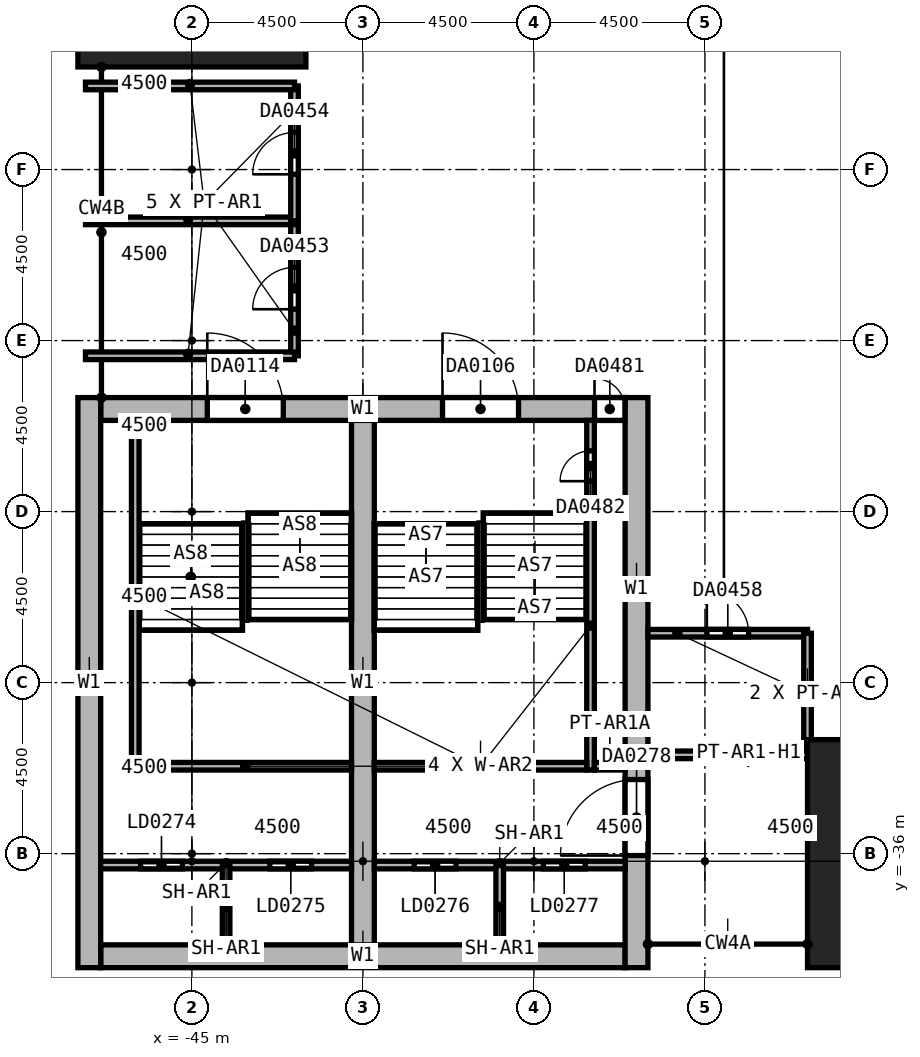
"""IFC4 building model, lengths in metres.
Left out: names, types, materials, properties, quantities, classifications, styles, units other than length and angle.
Written with IfcOpenShell. Run it as: python <this file> out.ifc"""

import sys

from ifc_helpers import new_model, si_unit, direction, frame, frame_2d, origin, origin_2d, place, context, subcontext, project, spatial, rectangle, extrude, element, fill, save


model = new_model("IFC4")
c1 = context("Model", 3, precision=1e-05, world=origin(), true_north=direction((0.0, 1.0)))
c2 = subcontext(c1, "Body", "Model", "MODEL_VIEW")
j1 = project(units=[si_unit("LENGTHUNIT", "METRE"), si_unit("PLANEANGLEUNIT", "RADIAN")], contexts=[c1])
p1 = place(None, origin())
s1 = spatial("IfcSite", under=j1, at=p1, CompositionType="ELEMENT")
p2 = place(p1, origin())
s2 = spatial("IfcBuilding", under=s1, at=p2, CompositionType="ELEMENT")
p3 = place(p2, frame((0.0, 0.0, 37.0)))
s3 = spatial("IfcBuildingStorey", under=s2, at=p3, CompositionType="ELEMENT", Elevation=37.0)
for number, where, z_axis, x_axis in (
    (1, (-27.0, -36.0, 0.0), (0.0, 0.0, 1.0), (1.0, 0.0, 0.0)),
    (2, (-45.0, -13.5, 0.0), (0.0, 0.0, 1.0), (0.0, 1.0, 0.0)),
):
    element("IfcColumn", number, at=place(p3, frame(where, z_axis=z_axis, x_axis=x_axis)), inside=s3, PredefinedType="COLUMN", context=c2, shape_type="SweptSolid", body=[
        extrude(rectangle(XDim=3.6, YDim=6.0, at=origin_2d()), origin(), (0.0, 0.0, 1.0), 5.8),
    ])
p4 = place(p3, frame((-47.4, -24.3, 0.0), z_axis=(0.0, 0.0, 1.0), x_axis=(1.0, 0.0, 0.0)))
e3 = element("IfcWall", 3, at=p4, inside=s3, PredefinedType="SHEAR", context=c2, shape_type="SweptSolid", body=[
    extrude(rectangle(XDim=13.8, YDim=0.6, at=frame_2d((6.9, 0.0))), origin(), (0.0, 0.0, 1.0), 7.0),
])
p5 = place(p4, frame((8.995, 0.0, 0.0)))
e4 = element("IfcOpeningElement", 4, at=p5, cuts=e3, PredefinedType="OPENING", context=c2, shape_type="SweptSolid", body=[
    extrude(rectangle(XDim=2.0, YDim=2.4, at=frame_2d((1.0, 1.2))), frame((0.0, 0.3, 0.0), z_axis=(0.0, -1.0, 0.0), x_axis=(1.0, 0.0, 0.0)), (0.0, 0.0, 1.0), 0.6),
])
p6 = place(p4, frame((2.805, 0.0, 0.0)))
e5 = element("IfcOpeningElement", 5, at=p6, cuts=e3, PredefinedType="OPENING", context=c2, shape_type="SweptSolid", body=[
    extrude(rectangle(XDim=2.0, YDim=2.4, at=frame_2d((1.0, 1.2))), frame((0.0, 0.3, 0.0), z_axis=(0.0, -1.0, 0.0), x_axis=(1.0, 0.0, 0.0)), (0.0, 0.0, 1.0), 0.6),
])
p7 = place(p4, frame((12.995, 0.0, 0.0)))
e6 = element("IfcOpeningElement", 6, at=p7, cuts=e3, PredefinedType="OPENING", context=c2, shape_type="SweptSolid", body=[
    extrude(rectangle(XDim=0.8, YDim=2.1, at=frame_2d((0.4, 1.05))), frame((0.0, 0.3, 0.0), z_axis=(0.0, -1.0, 0.0), x_axis=(1.0, 0.0, 0.0)), (0.0, 0.0, 1.0), 0.6),
])
p8 = place(p3, frame((-47.4, -38.7, 0.0), z_axis=(0.0, 0.0, 1.0), x_axis=(1.0, 0.0, 0.0)))
e7 = element("IfcWall", 7, at=p8, inside=s3, PredefinedType="SHEAR", context=c2, shape_type="SweptSolid", body=[
    extrude(rectangle(XDim=13.8, YDim=0.6, at=frame_2d((6.9, 0.0))), origin(), (0.0, 0.0, 1.0), 7.0),
])
p9 = place(p3, frame((-47.7, -39.0, 0.0), z_axis=(0.0, 0.0, 1.0), x_axis=(0.0, 1.0, 0.0)))
e8 = element("IfcWall", 8, at=p9, inside=s3, PredefinedType="SHEAR", context=c2, shape_type="SweptSolid", body=[
    extrude(rectangle(XDim=15.0, YDim=0.6, at=frame_2d((7.5, 0.0))), origin(), (0.0, 0.0, 1.0), 7.0),
])
p10 = place(p3, frame((-33.3, -39.0, 0.0), z_axis=(0.0, 0.0, 1.0), x_axis=(0.0, 1.0, 0.0)))
e9 = element("IfcWall", 9, at=p10, inside=s3, PredefinedType="SHEAR", context=c2, shape_type="SweptSolid", body=[
    extrude(rectangle(XDim=15.0, YDim=0.6, at=frame_2d((7.5, 0.0))), origin(), (0.0, 0.0, 1.0), 7.0),
])
p11 = place(p10, frame((2.95, 0.0, 0.0)))
e10 = element("IfcOpeningElement", 10, at=p11, cuts=e9, PredefinedType="OPENING", context=c2, shape_type="SweptSolid", body=[
    extrude(rectangle(XDim=2.0, YDim=2.4, at=frame_2d((1.0, 1.2))), frame((0.0, 0.3, 0.0), z_axis=(0.0, -1.0, 0.0), x_axis=(1.0, 0.0, 0.0)), (0.0, 0.0, 1.0), 0.6),
])
p12 = place(p3, frame((-40.5, -38.4, 0.0), z_axis=(0.0, 0.0, 1.0), x_axis=(0.0, 1.0, 0.0)))
e11 = element("IfcWall", 11, at=p12, inside=s3, PredefinedType="SHEAR", context=c2, shape_type="SweptSolid", body=[
    extrude(rectangle(XDim=13.8, YDim=0.6, at=frame_2d((6.9, 0.0))), origin(), (0.0, 0.0, 1.0), 7.0),
])
p13 = place(p3, frame((-34.51, -33.8, 0.0), z_axis=(0.0, 0.0, 1.0), x_axis=(0.0, 1.0, 0.0)))
e12 = element("IfcWall", 12, at=p13, inside=s3, PredefinedType="SOLIDWALL", context=c2, shape_type="SweptSolid", body=[
    extrude(rectangle(XDim=9.2, YDim=0.2, at=frame_2d((4.6, 0.0))), origin(), (0.0, 0.0, 1.0), 7.0),
])
p14 = place(p13, frame((7.6, 0.0, 0.0)))
e13 = element("IfcOpeningElement", 13, at=p14, cuts=e12, PredefinedType="OPENING", context=c2, shape_type="SweptSolid", body=[
    extrude(rectangle(XDim=0.8, YDim=2.1, at=frame_2d((0.4, 1.05))), frame((0.0, 0.1, 0.0), z_axis=(0.0, -1.0, 0.0), x_axis=(1.0, 0.0, 0.0)), (0.0, 0.0, 1.0), 0.2),
])
p15 = place(p3, frame((-40.2, -33.7, 0.0), z_axis=(0.0, 0.0, 1.0), x_axis=(1.0, 0.0, 0.0)))
e14 = element("IfcWall", 14, at=p15, inside=s3, PredefinedType="SOLIDWALL", context=c2, shape_type="SweptSolid", body=[
    extrude(rectangle(XDim=5.59, YDim=0.2, at=frame_2d((2.795, 0.0))), origin(), (0.0, 0.0, 1.0), 7.0),
])
p16 = place(p3, frame((-46.49, -33.8, 0.0), z_axis=(0.0, 0.0, 1.0), x_axis=(0.0, 1.0, 0.0)))
e15 = element("IfcWall", 15, at=p16, inside=s3, PredefinedType="SOLIDWALL", context=c2, shape_type="SweptSolid", body=[
    extrude(rectangle(XDim=9.2, YDim=0.2, at=frame_2d((4.6, 0.0))), origin(), (0.0, 0.0, 1.0), 7.0),
])
p17 = place(p3, frame((-46.39, -33.7, 0.0), z_axis=(0.0, 0.0, 1.0), x_axis=(1.0, 0.0, 0.0)))
e16 = element("IfcWall", 16, at=p17, inside=s3, PredefinedType="SOLIDWALL", context=c2, shape_type="SweptSolid", body=[
    extrude(rectangle(XDim=5.59, YDim=0.2, at=frame_2d((2.795, 0.0))), origin(), (0.0, 0.0, 1.0), 7.0),
])
p18 = place(p3, frame((-47.4, -36.3, 0.0), z_axis=(0.0, 0.0, 1.0), x_axis=(1.0, 0.0, 0.0)))
e17 = element("IfcWall", 17, at=p18, inside=s3, PredefinedType="SHEAR", context=c2, shape_type="SweptSolid", body=[
    extrude(rectangle(XDim=6.6, YDim=0.2, at=frame_2d((3.3, 0.0))), origin(), (0.0, 0.0, 1.0), 7.0),
])
p19 = place(p18, frame((1.05, 0.0, 0.0)))
e18 = element("IfcOpeningElement", 18, at=p19, cuts=e17, PredefinedType="OPENING", context=c2, shape_type="SweptSolid", body=[
    extrude(rectangle(XDim=1.1, YDim=2.4, at=frame_2d((0.55, 1.2))), frame((0.0, 0.1, 0.0), z_axis=(0.0, -1.0, 0.0), x_axis=(1.0, 0.0, 0.0)), (0.0, 0.0, 1.0), 0.2),
])
p20 = place(p18, frame((4.45, 0.0, 0.0)))
e19 = element("IfcOpeningElement", 19, at=p20, cuts=e17, PredefinedType="OPENING", context=c2, shape_type="SweptSolid", body=[
    extrude(rectangle(XDim=1.1, YDim=2.4, at=frame_2d((0.55, 1.2))), frame((0.0, 0.1, 0.0), z_axis=(0.0, -1.0, 0.0), x_axis=(1.0, 0.0, 0.0)), (0.0, 0.0, 1.0), 0.2),
])
p21 = place(p3, frame((-40.2, -36.3, 0.0), z_axis=(0.0, 0.0, 1.0), x_axis=(1.0, 0.0, 0.0)))
e20 = element("IfcWall", 20, at=p21, inside=s3, PredefinedType="SHEAR", context=c2, shape_type="SweptSolid", body=[
    extrude(rectangle(XDim=6.6, YDim=0.2, at=frame_2d((3.3, 0.0))), origin(), (0.0, 0.0, 1.0), 7.0),
])
p22 = place(p21, frame((1.05, 0.0, 0.0)))
e21 = element("IfcOpeningElement", 21, at=p22, cuts=e20, PredefinedType="OPENING", context=c2, shape_type="SweptSolid", body=[
    extrude(rectangle(XDim=1.1, YDim=2.4, at=frame_2d((0.55, 1.2))), frame((0.0, 0.1, 0.0), z_axis=(0.0, -1.0, 0.0), x_axis=(1.0, 0.0, 0.0)), (0.0, 0.0, 1.0), 0.2),
])
p23 = place(p21, frame((4.45, 0.0, 0.0)))
e22 = element("IfcOpeningElement", 22, at=p23, cuts=e20, PredefinedType="OPENING", context=c2, shape_type="SweptSolid", body=[
    extrude(rectangle(XDim=1.1, YDim=2.4, at=frame_2d((0.55, 1.2))), frame((0.0, 0.1, 0.0), z_axis=(0.0, -1.0, 0.0), x_axis=(1.0, 0.0, 0.0)), (0.0, 0.0, 1.0), 0.2),
])
for number, where, z_axis, x_axis in (
    (23, (-36.9, -38.4, 0.0), (0.0, 0.0, 1.0), (0.0, 1.0, 0.0)),
    (24, (-44.1, -38.4, 0.0), (0.0, 0.0, 1.0), (0.0, 1.0, 0.0)),
):
    element("IfcWall", number, at=place(p3, frame(where, z_axis=z_axis, x_axis=x_axis)), inside=s3, PredefinedType="SHEAR", context=c2, shape_type="SweptSolid", body=[
        extrude(rectangle(XDim=2.1, YDim=0.2, at=frame_2d((1.05, 0.0))), origin(), (0.0, 0.0, 1.0), 7.0),
    ])
p24 = place(p3, frame((-42.3, -22.9, 0.0), z_axis=(0.0, 0.0, 1.0), x_axis=(0.0, 1.0, 0.0)))
e25 = element("IfcWall", 25, at=p24, inside=s3, PredefinedType="PARTITIONING", context=c2, shape_type="SweptSolid", body=[
    extrude(rectangle(XDim=3.55, YDim=0.2, at=frame_2d((1.775, 0.0))), origin(), (0.0, 0.0, 1.0), 6.7),
])
p25 = place(p24, frame((1.225, 0.0, 0.0)))
e26 = element("IfcOpeningElement", 26, at=p25, cuts=e25, PredefinedType="OPENING", context=c2, shape_type="SweptSolid", body=[
    extrude(rectangle(XDim=1.1, YDim=2.4, at=frame_2d((0.55, 1.2))), frame((0.0, 0.1, 0.0), z_axis=(0.0, -1.0, 0.0), x_axis=(1.0, 0.0, 0.0)), (0.0, 0.0, 1.0), 0.2),
])
for number, where, z_axis, x_axis in (
    (27, (-42.3, -22.9, 0.0), (0.0, 0.0, 1.0), (-1.0, 0.0, 0.0)),
    (28, (-47.8, -19.35, 0.0), (0.0, 0.0, 1.0), (1.0, 0.0, 0.0)),
):
    element("IfcWall", number, at=place(p3, frame(where, z_axis=z_axis, x_axis=x_axis)), inside=s3, PredefinedType="PARTITIONING", context=c2, shape_type="SweptSolid", body=[
        extrude(rectangle(XDim=5.5, YDim=0.2, at=frame_2d((2.75, 0.0))), origin(), (0.0, 0.0, 1.0), 6.7),
    ])
p26 = place(p3, frame((-42.3, -19.35, 0.0), z_axis=(0.0, 0.0, 1.0), x_axis=(0.0, 1.0, 0.0)))
e29 = element("IfcWall", 29, at=p26, inside=s3, PredefinedType="PARTITIONING", context=c2, shape_type="SweptSolid", body=[
    extrude(rectangle(XDim=3.55, YDim=0.2, at=frame_2d((1.775, 0.0))), origin(), (0.0, 0.0, 1.0), 6.7),
])
p27 = place(p26, frame((1.225, 0.0, 0.0)))
e30 = element("IfcOpeningElement", 30, at=p27, cuts=e29, PredefinedType="OPENING", context=c2, shape_type="SweptSolid", body=[
    extrude(rectangle(XDim=1.1, YDim=2.4, at=frame_2d((0.55, 1.2))), frame((0.0, 0.1, 0.0), z_axis=(0.0, -1.0, 0.0), x_axis=(1.0, 0.0, 0.0)), (0.0, 0.0, 1.0), 0.2),
])
p28 = place(p3, frame((-42.3, -15.8, 0.0), z_axis=(0.0, 0.0, 1.0), x_axis=(-1.0, 0.0, 0.0)))
e31 = element("IfcWall", 31, at=p28, inside=s3, PredefinedType="PARTITIONING", context=c2, shape_type="SweptSolid", body=[
    extrude(rectangle(XDim=5.5, YDim=0.2, at=frame_2d((2.75, 0.0))), origin(), (0.0, 0.0, 1.0), 6.7),
])
p29 = place(p3, frame((-33.0, -30.2, 0.0), z_axis=(0.0, 0.0, 1.0), x_axis=(1.0, 0.0, 0.0)))
e32 = element("IfcWall", 32, at=p29, inside=s3, PredefinedType="PARTITIONING", context=c2, shape_type="SweptSolid", body=[
    extrude(rectangle(XDim=4.2, YDim=0.2, at=frame_2d((2.1, 0.0))), origin(), (0.0, 0.0, 1.0), 6.7),
])
p30 = place(p29, frame((1.55, 0.0, 0.0)))
e33 = element("IfcOpeningElement", 33, at=p30, cuts=e32, PredefinedType="OPENING", context=c2, shape_type="SweptSolid", body=[
    extrude(rectangle(XDim=1.1, YDim=2.4, at=frame_2d((0.55, 1.2))), frame((0.0, 0.1, 0.0), z_axis=(0.0, -1.0, 0.0), x_axis=(1.0, 0.0, 0.0)), (0.0, 0.0, 1.0), 0.2),
])
p31 = place(p3, frame((-28.8, -33.4, 0.0), z_axis=(0.0, 0.0, 1.0), x_axis=(0.0, 1.0, 0.0)))
e34 = element("IfcWall", 34, at=p31, inside=s3, PredefinedType="PARTITIONING", context=c2, shape_type="SweptSolid", body=[
    extrude(rectangle(XDim=3.2, YDim=0.2, at=frame_2d((1.6, 0.0))), origin(), (0.0, 0.0, 1.0), 6.7),
])
p32 = place(p3, frame((-33.0, -33.4, 0.0), z_axis=(0.0, 0.0, 1.0), x_axis=(1.0, 0.0, 0.0)))
e35 = element("IfcWall", 35, at=p32, inside=s3, PredefinedType="PARTITIONING", context=c2, shape_type="SweptSolid", body=[
    extrude(rectangle(XDim=4.2, YDim=0.2, at=frame_2d((2.1, 0.0))), origin(), (0.0, 0.0, 1.0), 6.089),
])
p33 = place(p3, frame((-34.41, -33.7, 0.0), z_axis=(0.0, 0.0, 1.0), x_axis=(1.0, 0.0, 0.0)))
e36 = element("IfcWall", 36, at=p33, inside=s3, PredefinedType="PARTITIONING", context=c2, shape_type="SweptSolid", body=[
    extrude(rectangle(XDim=0.81, YDim=0.2, at=frame_2d((0.405, 0.0))), origin(), (0.0, 0.0, 1.0), 7.0),
])
p34 = place(p5, frame((2.0, 0.0, 0.0), z_axis=(0.0, 0.0, 1.0), x_axis=(-1.0, 0.0, 0.0)))
e37 = element("IfcDoor", 37, at=p34, inside=s3, OperationType="DOUBLE_DOOR_SINGLE_SWING", PredefinedType="DOOR", context=c2, shape_type="SweptSolid", body=[
    extrude(rectangle(XDim=2.0, YDim=2.4, at=frame_2d((1.0, 1.2))), frame((0.0, 0.025, 0.0), z_axis=(0.0, -1.0, 0.0), x_axis=(1.0, 0.0, 0.0)), (0.0, 0.0, 1.0), 0.05),
])
fill(e4, e37)
p35 = place(p6, frame((2.0, 0.0, 0.0), z_axis=(0.0, 0.0, 1.0), x_axis=(-1.0, 0.0, 0.0)))
e38 = element("IfcDoor", 38, at=p35, inside=s3, OperationType="DOUBLE_DOOR_SINGLE_SWING", PredefinedType="DOOR", context=c2, shape_type="SweptSolid", body=[
    extrude(rectangle(XDim=2.0, YDim=2.4, at=frame_2d((1.0, 1.2))), frame((0.0, 0.025, 0.0), z_axis=(0.0, -1.0, 0.0), x_axis=(1.0, 0.0, 0.0)), (0.0, 0.0, 1.0), 0.05),
])
fill(e5, e38)
p36 = place(p19, frame((1.1, 0.0, 0.0), z_axis=(0.0, 0.0, 1.0), x_axis=(-1.0, 0.0, 0.0)))
e39 = element("IfcDoor", 39, at=p36, inside=s3, OperationType="DOUBLE_DOOR_SLIDING", PredefinedType="DOOR", context=c2, shape_type="SweptSolid", body=[
    extrude(rectangle(XDim=1.1, YDim=2.4, at=frame_2d((0.55, 1.2))), frame((0.0, 0.025, 0.0), z_axis=(0.0, -1.0, 0.0), x_axis=(1.0, 0.0, 0.0)), (0.0, 0.0, 1.0), 0.05),
])
fill(e18, e39)
p37 = place(p20, frame((1.1, 0.0, 0.0), z_axis=(0.0, 0.0, 1.0), x_axis=(-1.0, 0.0, 0.0)))
e40 = element("IfcDoor", 40, at=p37, inside=s3, OperationType="DOUBLE_DOOR_SLIDING", PredefinedType="DOOR", context=c2, shape_type="SweptSolid", body=[
    extrude(rectangle(XDim=1.1, YDim=2.4, at=frame_2d((0.55, 1.2))), frame((0.0, 0.025, 0.0), z_axis=(0.0, -1.0, 0.0), x_axis=(1.0, 0.0, 0.0)), (0.0, 0.0, 1.0), 0.05),
])
fill(e19, e40)
p38 = place(p22, frame((1.1, 0.0, 0.0), z_axis=(0.0, 0.0, 1.0), x_axis=(-1.0, 0.0, 0.0)))
e41 = element("IfcDoor", 41, at=p38, inside=s3, OperationType="DOUBLE_DOOR_SLIDING", PredefinedType="DOOR", context=c2, shape_type="SweptSolid", body=[
    extrude(rectangle(XDim=1.1, YDim=2.4, at=frame_2d((0.55, 1.2))), frame((0.0, 0.025, 0.0), z_axis=(0.0, -1.0, 0.0), x_axis=(1.0, 0.0, 0.0)), (0.0, 0.0, 1.0), 0.05),
])
fill(e21, e41)
p39 = place(p23, frame((1.1, 0.0, 0.0), z_axis=(0.0, 0.0, 1.0), x_axis=(-1.0, 0.0, 0.0)))
e42 = element("IfcDoor", 42, at=p39, inside=s3, OperationType="DOUBLE_DOOR_SLIDING", PredefinedType="DOOR", context=c2, shape_type="SweptSolid", body=[
    extrude(rectangle(XDim=1.1, YDim=2.4, at=frame_2d((0.55, 1.2))), frame((0.0, 0.025, 0.0), z_axis=(0.0, -1.0, 0.0), x_axis=(1.0, 0.0, 0.0)), (0.0, 0.0, 1.0), 0.05),
])
fill(e22, e42)
p40 = place(p11, origin())
e43 = element("IfcDoor", 43, at=p40, inside=s3, OperationType="DOUBLE_DOOR_SINGLE_SWING", PredefinedType="DOOR", context=c2, shape_type="SweptSolid", body=[
    extrude(rectangle(XDim=2.0, YDim=2.4, at=frame_2d((1.0, 1.2))), frame((0.0, 0.025, 0.0), z_axis=(0.0, -1.0, 0.0), x_axis=(1.0, 0.0, 0.0)), (0.0, 0.0, 1.0), 0.05),
])
fill(e10, e43)
p41 = place(p25, origin())
e44 = element("IfcDoor", 44, at=p41, inside=s3, OperationType="DOUBLE_DOOR_SINGLE_SWING", PredefinedType="DOOR", context=c2, shape_type="SweptSolid", body=[
    extrude(rectangle(XDim=1.1, YDim=2.4, at=frame_2d((0.55, 1.2))), frame((0.0, 0.025, 0.0), z_axis=(0.0, -1.0, 0.0), x_axis=(1.0, 0.0, 0.0)), (0.0, 0.0, 1.0), 0.05),
])
fill(e26, e44)
p42 = place(p27, origin())
e45 = element("IfcDoor", 45, at=p42, inside=s3, OperationType="DOUBLE_DOOR_SINGLE_SWING", PredefinedType="DOOR", context=c2, shape_type="SweptSolid", body=[
    extrude(rectangle(XDim=1.1, YDim=2.4, at=frame_2d((0.55, 1.2))), frame((0.0, 0.025, 0.0), z_axis=(0.0, -1.0, 0.0), x_axis=(1.0, 0.0, 0.0)), (0.0, 0.0, 1.0), 0.05),
])
fill(e30, e45)
p43 = place(p30, origin())
e46 = element("IfcDoor", 46, at=p43, inside=s3, OperationType="DOUBLE_DOOR_SINGLE_SWING", PredefinedType="DOOR", context=c2, shape_type="SweptSolid", body=[
    extrude(rectangle(XDim=1.1, YDim=2.4, at=frame_2d((0.55, 1.2))), frame((0.0, 0.025, 0.0), z_axis=(0.0, -1.0, 0.0), x_axis=(1.0, 0.0, 0.0)), (0.0, 0.0, 1.0), 0.05),
])
fill(e33, e46)
p44 = place(p7, origin())
e47 = element("IfcDoor", 47, at=p44, inside=s3, OperationType="SINGLE_SWING_LEFT", PredefinedType="DOOR", context=c2, shape_type="SweptSolid", body=[
    extrude(rectangle(XDim=0.8, YDim=2.1, at=frame_2d((0.4, 1.05))), frame((0.0, 0.025, 0.0), z_axis=(0.0, -1.0, 0.0), x_axis=(1.0, 0.0, 0.0)), (0.0, 0.0, 1.0), 0.05),
])
fill(e6, e47)
p45 = place(p14, origin())
e48 = element("IfcDoor", 48, at=p45, inside=s3, OperationType="SINGLE_SWING_LEFT", PredefinedType="DOOR", context=c2, shape_type="SweptSolid", body=[
    extrude(rectangle(XDim=0.8, YDim=2.1, at=frame_2d((0.4, 1.05))), frame((0.0, 0.025, 0.0), z_axis=(0.0, -1.0, 0.0), x_axis=(1.0, 0.0, 0.0)), (0.0, 0.0, 1.0), 0.05),
])
fill(e13, e48)
save(model, sys.argv[1])
